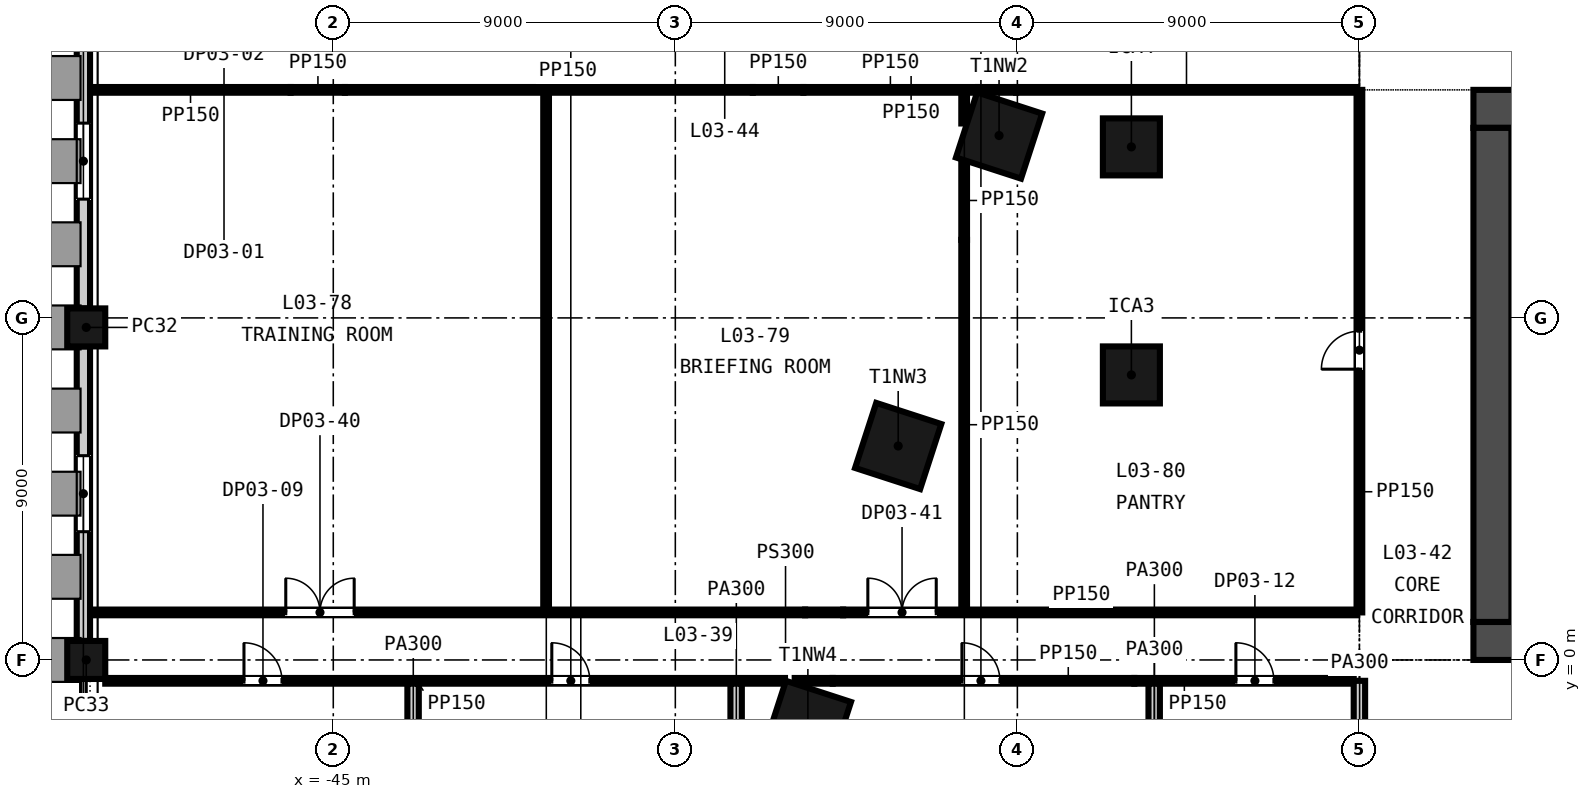
"""IFC4 building model, lengths in metres.
Left out: names, types, materials, properties, quantities, classifications, styles, units other than length and angle.
Written with IfcOpenShell. Run it as: python <this file> out.ifc"""

import sys

from ifc_helpers import new_model, si_unit, direction, frame, frame_2d, origin, origin_2d, place, context, subcontext, project, spatial, rectangle, extrude, element, fill, save


model = new_model("IFC4")
c1 = context("Model", 3, precision=1e-05, world=origin(), true_north=direction((0.0, 1.0)))
c2 = subcontext(c1, "Body", "Model", "MODEL_VIEW")
j1 = project(units=[si_unit("LENGTHUNIT", "METRE"), si_unit("PLANEANGLEUNIT", "RADIAN")], contexts=[c1])
p1 = place(None, origin())
s1 = spatial("IfcSite", under=j1, at=p1, CompositionType="ELEMENT")
p2 = place(p1, origin())
s2 = spatial("IfcBuilding", under=s1, at=p2, CompositionType="ELEMENT")
p3 = place(p2, frame((0.0, 0.0, 22.5)))
s3 = spatial("IfcBuildingStorey", under=s2, at=p3, CompositionType="ELEMENT", Elevation=22.5)
p4 = place(p3, frame((-15.0, 0.5, -0.3), z_axis=(0.0, 0.0, 1.0), x_axis=(1.0, 0.0, 0.0)))
e1 = element("IfcWall", 1, at=p4, inside=s3, PredefinedType="SOLIDWALL", context=c2, shape_type="SweptSolid", body=[
    extrude(rectangle(XDim=30.0, YDim=1.0, at=frame_2d((15.0, 0.0))), origin(), (0.0, 0.0, 1.0), 4.5),
])
p5 = place(p4, frame((5.8, 0.0, 0.3)))
e2 = element("IfcOpeningElement", 2, at=p5, cuts=e1, PredefinedType="OPENING", context=c2, shape_type="SweptSolid", body=[
    extrude(rectangle(XDim=2.4, YDim=2.4, at=frame_2d((1.2, 1.2))), frame((0.0, 0.51, 0.0), z_axis=(0.0, -1.0, 0.0), x_axis=(1.0, 0.0, 0.0)), (0.0, 0.0, 1.0), 1.02),
])
p6 = place(p4, frame((13.8, 0.0, 0.3)))
e3 = element("IfcOpeningElement", 3, at=p6, cuts=e1, PredefinedType="OPENING", context=c2, shape_type="SweptSolid", body=[
    extrude(rectangle(XDim=2.4, YDim=2.4, at=frame_2d((1.2, 1.2))), frame((0.0, 0.51, 0.0), z_axis=(0.0, -1.0, 0.0), x_axis=(1.0, 0.0, 0.0)), (0.0, 0.0, 1.0), 1.02),
])
p7 = place(p4, frame((21.8, 0.0, 0.3)))
e4 = element("IfcOpeningElement", 4, at=p7, cuts=e1, PredefinedType="OPENING", context=c2, shape_type="SweptSolid", body=[
    extrude(rectangle(XDim=2.4, YDim=2.4, at=frame_2d((1.2, 1.2))), frame((0.0, 0.51, 0.0), z_axis=(0.0, -1.0, 0.0), x_axis=(1.0, 0.0, 0.0)), (0.0, 0.0, 1.0), 1.02),
])
p8 = place(p4, frame((1.5, 0.0, 0.3)))
e5 = element("IfcOpeningElement", 5, at=p8, cuts=e1, PredefinedType="OPENING", context=c2, shape_type="SweptSolid", body=[
    extrude(rectangle(XDim=1.2, YDim=2.1, at=frame_2d((0.6, 1.05))), frame((0.0, 0.51, 0.0), z_axis=(0.0, -1.0, 0.0), x_axis=(1.0, 0.0, 0.0)), (0.0, 0.0, 1.0), 1.02),
])
p9 = place(p4, frame((27.3, 0.0, 0.3)))
e6 = element("IfcOpeningElement", 6, at=p9, cuts=e1, PredefinedType="OPENING", context=c2, shape_type="SweptSolid", body=[
    extrude(rectangle(XDim=1.2, YDim=2.1, at=frame_2d((0.6, 1.05))), frame((0.0, 0.51, 0.0), z_axis=(0.0, -1.0, 0.0), x_axis=(1.0, 0.0, 0.0)), (0.0, 0.0, 1.0), 1.02),
])
p10 = place(p3, frame((-15.0, 14.5, -0.3), z_axis=(0.0, 0.0, 1.0), x_axis=(1.0, 0.0, 0.0)))
e7 = element("IfcWall", 7, at=p10, inside=s3, PredefinedType="SOLIDWALL", context=c2, shape_type="SweptSolid", body=[
    extrude(rectangle(XDim=30.0, YDim=1.0, at=frame_2d((15.0, 0.0))), origin(), (0.0, 0.0, 1.0), 4.5),
])
p11 = place(p10, frame((9.25, 0.0, 0.3)))
e8 = element("IfcOpeningElement", 8, at=p11, cuts=e7, PredefinedType="OPENING", context=c2, shape_type="SweptSolid", body=[
    extrude(rectangle(XDim=1.5, YDim=2.1, at=frame_2d((0.75, 1.05))), frame((0.0, 0.51, 0.0), z_axis=(0.0, -1.0, 0.0), x_axis=(1.0, 0.0, 0.0)), (0.0, 0.0, 1.0), 1.02),
])
p12 = place(p10, frame((19.4, 0.0, 0.3)))
e9 = element("IfcOpeningElement", 9, at=p12, cuts=e7, PredefinedType="OPENING", context=c2, shape_type="SweptSolid", body=[
    extrude(rectangle(XDim=1.5, YDim=2.1, at=frame_2d((0.75, 1.05))), frame((0.0, 0.51, 0.0), z_axis=(0.0, -1.0, 0.0), x_axis=(1.0, 0.0, 0.0)), (0.0, 0.0, 1.0), 1.02),
])
p13 = place(p10, frame((1.5, 0.0, 0.3)))
e10 = element("IfcOpeningElement", 10, at=p13, cuts=e7, PredefinedType="OPENING", context=c2, shape_type="SweptSolid", body=[
    extrude(rectangle(XDim=1.2, YDim=2.1, at=frame_2d((0.6, 1.05))), frame((0.0, 0.51, 0.0), z_axis=(0.0, -1.0, 0.0), x_axis=(1.0, 0.0, 0.0)), (0.0, 0.0, 1.0), 1.02),
])
p14 = place(p10, frame((27.3, 0.0, 0.3)))
e11 = element("IfcOpeningElement", 11, at=p14, cuts=e7, PredefinedType="OPENING", context=c2, shape_type="SweptSolid", body=[
    extrude(rectangle(XDim=1.2, YDim=2.1, at=frame_2d((0.6, 1.05))), frame((0.0, 0.51, 0.0), z_axis=(0.0, -1.0, 0.0), x_axis=(1.0, 0.0, 0.0)), (0.0, 0.0, 1.0), 1.02),
])
p15 = place(p3, frame((-14.5, 1.0, -0.3), z_axis=(0.0, 0.0, 1.0), x_axis=(0.0, 1.0, 0.0)))
e12 = element("IfcWall", 12, at=p15, inside=s3, PredefinedType="SOLIDWALL", context=c2, shape_type="SweptSolid", body=[
    extrude(rectangle(XDim=13.0, YDim=1.0, at=frame_2d((6.5, 0.0))), origin(), (0.0, 0.0, 1.0), 4.5),
])
for number, where, z_axis, x_axis in (
    (13, (-27.482, 13.799, -0.3), (0.0, 0.0, 1.0), (-0.309, -0.951, 0.0)),
    (14, (-30.136, 5.63, -0.3), (0.0, 0.0, 1.0), (-0.309, -0.951, 0.0)),
    (15, (-32.512, -1.683, -0.3), (0.0, 0.0, 1.0), (-0.309, -0.951, 0.0)),
):
    element("IfcColumn", number, at=place(p3, frame(where, z_axis=z_axis, x_axis=x_axis)), inside=s3, PredefinedType="COLUMN", context=c2, shape_type="SweptSolid", body=[
        extrude(rectangle(XDim=1.8, YDim=1.8, at=origin_2d()), origin(), (0.0, 0.0, 1.0), 4.5),
    ])
for number, where, z_axis, x_axis in (
    (16, (-24.0, 7.5, -0.3), (0.0, 0.0, 1.0), (1.0, 0.0, 0.0)),
    (17, (-24.0, 13.5, -0.3), (0.0, 0.0, 1.0), (1.0, 0.0, 0.0)),
):
    element("IfcColumn", number, at=place(p3, frame(where, z_axis=z_axis, x_axis=x_axis)), inside=s3, PredefinedType="COLUMN", context=c2, shape_type="SweptSolid", body=[
        extrude(rectangle(XDim=1.5, YDim=1.5, at=origin_2d()), origin(), (0.0, 0.0, 1.0), 4.5),
    ])
for number, where, z_axis, x_axis in (
    (18, (-51.5, 8.75, -0.3), (0.0, 0.0, 1.0), (0.0, -1.0, 0.0)),
    (19, (-51.5, 0.0, -0.3), (0.0, 0.0, 1.0), (0.0, -1.0, 0.0)),
):
    element("IfcColumn", number, at=place(p3, frame(where, z_axis=z_axis, x_axis=x_axis)), inside=s3, PredefinedType="COLUMN", context=c2, shape_type="SweptSolid", body=[
        extrude(rectangle(XDim=1.0, YDim=1.0, at=origin_2d()), origin(), (0.0, 0.0, 1.0), 4.5),
    ])
p16 = place(p3, frame((-51.575, 17.0, -0.3), z_axis=(0.0, 0.0, 1.0), x_axis=(0.0, -1.0, 0.0)))
e20 = element("IfcWall", 20, at=p16, inside=s3, PredefinedType="SOLIDWALL", context=c2, shape_type="SweptSolid", body=[
    extrude(rectangle(XDim=7.75, YDim=0.35, at=frame_2d((3.875, 0.0))), origin(), (0.0, 0.0, 1.0), 3.6),
])
p17 = place(p16, frame((2.875, 0.0, 1.2)))
e21 = element("IfcOpeningElement", 21, at=p17, cuts=e20, PredefinedType="OPENING", context=c2, shape_type="SweptSolid", body=[
    extrude(rectangle(XDim=2.0, YDim=2.35, at=frame_2d((1.0, 1.175))), frame((0.0, 0.185, 0.0), z_axis=(0.0, -1.0, 0.0), x_axis=(1.0, 0.0, 0.0)), (0.0, 0.0, 1.0), 0.37),
])
p18 = place(p3, frame((-51.575, 8.25, -0.3), z_axis=(0.0, 0.0, 1.0), x_axis=(0.0, -1.0, 0.0)))
e22 = element("IfcWall", 22, at=p18, inside=s3, PredefinedType="SOLIDWALL", context=c2, shape_type="SweptSolid", body=[
    extrude(rectangle(XDim=7.75, YDim=0.35, at=frame_2d((3.875, 0.0))), origin(), (0.0, 0.0, 1.0), 3.6),
])
p19 = place(p18, frame((2.875, 0.0, 1.2)))
e23 = element("IfcOpeningElement", 23, at=p19, cuts=e22, PredefinedType="OPENING", context=c2, shape_type="SweptSolid", body=[
    extrude(rectangle(XDim=2.0, YDim=2.35, at=frame_2d((1.0, 1.175))), frame((0.0, 0.185, 0.0), z_axis=(0.0, -1.0, 0.0), x_axis=(1.0, 0.0, 0.0)), (0.0, 0.0, 1.0), 0.37),
])
p20 = place(p3, frame((-51.0, -0.549, 0.0), z_axis=(0.0, 0.0, 1.0), x_axis=(1.0, 0.0, 0.0)))
e24 = element("IfcWall", 24, at=p20, inside=s3, PredefinedType="PARTITIONING", context=c2, shape_type="SweptSolid", body=[
    extrude(rectangle(XDim=17.886, YDim=0.15, at=frame_2d((8.943, 0.0))), origin(), (0.0, 0.0, 1.0), 4.2),
])
p21 = place(p20, frame((3.65, 0.0, 0.0)))
e25 = element("IfcOpeningElement", 25, at=p21, cuts=e24, PredefinedType="OPENING", context=c2, shape_type="SweptSolid", body=[
    extrude(rectangle(XDim=1.0, YDim=2.1, at=frame_2d((0.5, 1.05))), frame((0.0, 0.085, 0.0), z_axis=(0.0, -1.0, 0.0), x_axis=(1.0, 0.0, 0.0)), (0.0, 0.0, 1.0), 0.17),
])
p22 = place(p20, frame((11.75, 0.0, 0.0)))
e26 = element("IfcOpeningElement", 26, at=p22, cuts=e24, PredefinedType="OPENING", context=c2, shape_type="SweptSolid", body=[
    extrude(rectangle(XDim=1.0, YDim=2.1, at=frame_2d((0.5, 1.05))), frame((0.0, 0.085, 0.0), z_axis=(0.0, -1.0, 0.0), x_axis=(1.0, 0.0, 0.0)), (0.0, 0.0, 1.0), 0.17),
])
p23 = place(p3, frame((-32.859, -0.549, 0.0), z_axis=(0.0, 0.0, 1.0), x_axis=(1.0, 0.0, 0.0)))
e27 = element("IfcWall", 27, at=p23, inside=s3, PredefinedType="PARTITIONING", context=c2, shape_type="SweptSolid", body=[
    extrude(rectangle(XDim=1.0, YDim=0.15, at=frame_2d((0.5, 0.0))), origin(), (0.0, 0.0, 1.0), 3.2),
])
p24 = place(p3, frame((-31.859, -0.549, 0.0), z_axis=(0.0, 0.0, 1.0), x_axis=(1.0, 0.0, 0.0)))
e28 = element("IfcWall", 28, at=p24, inside=s3, PredefinedType="PARTITIONING", context=c2, shape_type="SweptSolid", body=[
    extrude(rectangle(XDim=7.936, YDim=0.15, at=frame_2d((3.968, 0.0))), origin(), (0.0, 0.0, 1.0), 4.2),
])
p25 = place(p24, frame((3.4, 0.0, 0.0)))
e29 = element("IfcOpeningElement", 29, at=p25, cuts=e28, PredefinedType="OPENING", context=c2, shape_type="SweptSolid", body=[
    extrude(rectangle(XDim=1.0, YDim=2.1, at=frame_2d((0.5, 1.05))), frame((0.0, 0.085, 0.0), z_axis=(0.0, -1.0, 0.0), x_axis=(1.0, 0.0, 0.0)), (0.0, 0.0, 1.0), 0.17),
])
p26 = place(p3, frame((-23.923, -0.549, 0.0), z_axis=(0.0, 0.0, 1.0), x_axis=(1.0, 0.0, 0.0)))
e30 = element("IfcWall", 30, at=p26, inside=s3, PredefinedType="PARTITIONING", context=c2, shape_type="SweptSolid", body=[
    extrude(rectangle(XDim=5.773, YDim=0.15, at=frame_2d((2.886, 0.0))), origin(), (0.0, 0.0, 1.0), 3.521),
])
p27 = place(p26, frame((2.673, 0.0, 0.0)))
e31 = element("IfcOpeningElement", 31, at=p27, cuts=e30, PredefinedType="OPENING", context=c2, shape_type="SweptSolid", body=[
    extrude(rectangle(XDim=1.0, YDim=2.1, at=frame_2d((0.5, 1.05))), frame((0.0, 0.085, 0.0), z_axis=(0.0, -1.0, 0.0), x_axis=(1.0, 0.0, 0.0)), (0.0, 0.0, 1.0), 0.17),
])
p28 = place(p3, frame((-51.4, 1.251, 0.0), z_axis=(0.0, 0.0, 1.0), x_axis=(1.0, 0.0, 0.0)))
e32 = element("IfcWall", 32, at=p28, inside=s3, PredefinedType="PARTITIONING", context=c2, shape_type="SweptSolid", body=[
    extrude(rectangle(XDim=18.815, YDim=0.15, at=frame_2d((9.408, 0.0))), origin(), (0.0, 0.0, 1.0), 4.2),
])
p29 = place(p28, frame((5.15, 0.0, 0.0)))
e33 = element("IfcOpeningElement", 33, at=p29, cuts=e32, PredefinedType="OPENING", context=c2, shape_type="SweptSolid", body=[
    extrude(rectangle(XDim=1.8, YDim=2.4, at=frame_2d((0.9, 1.2))), frame((0.0, 0.085, 0.0), z_axis=(0.0, -1.0, 0.0), x_axis=(1.0, 0.0, 0.0)), (0.0, 0.0, 1.0), 0.17),
])
p30 = place(p3, frame((-32.584, 1.251, 0.0), z_axis=(0.0, 0.0, 1.0), x_axis=(1.0, 0.0, 0.0)))
e34 = element("IfcWall", 34, at=p30, inside=s3, PredefinedType="PARTITIONING", context=c2, shape_type="SweptSolid", body=[
    extrude(rectangle(XDim=1.0, YDim=0.15, at=frame_2d((0.5, 0.0))), origin(), (0.0, 0.0, 1.0), 3.2),
])
p31 = place(p3, frame((-31.584, 1.251, 0.0), z_axis=(0.0, 0.0, 1.0), x_axis=(1.0, 0.0, 0.0)))
e35 = element("IfcWall", 35, at=p31, inside=s3, PredefinedType="PARTITIONING", context=c2, shape_type="SweptSolid", body=[
    extrude(rectangle(XDim=13.51, YDim=0.15, at=frame_2d((6.755, 0.0))), origin(), (0.0, 0.0, 1.0), 4.2),
])
p32 = place(p31, frame((0.65, 0.0, 0.0)))
e36 = element("IfcOpeningElement", 36, at=p32, cuts=e35, PredefinedType="OPENING", context=c2, shape_type="SweptSolid", body=[
    extrude(rectangle(XDim=1.8, YDim=2.4, at=frame_2d((0.9, 1.2))), frame((0.0, 0.085, 0.0), z_axis=(0.0, -1.0, 0.0), x_axis=(1.0, 0.0, 0.0)), (0.0, 0.0, 1.0), 0.17),
])
p33 = place(p3, frame((-51.4, 15.0, 0.0), z_axis=(0.0, 0.0, 1.0), x_axis=(1.0, 0.0, 0.0)))
e37 = element("IfcWall", 37, at=p33, inside=s3, PredefinedType="PARTITIONING", context=c2, shape_type="SweptSolid", body=[
    extrude(rectangle(XDim=5.277, YDim=0.15, at=frame_2d((2.639, 0.0))), origin(), (0.0, 0.0, 1.0), 4.2),
])
p34 = place(p3, frame((-46.123, 15.0, 0.0), z_axis=(0.0, 0.0, 1.0), x_axis=(1.0, 0.0, 0.0)))
e38 = element("IfcWall", 38, at=p34, inside=s3, PredefinedType="PARTITIONING", context=c2, shape_type="SweptSolid", body=[
    extrude(rectangle(XDim=1.428, YDim=0.15, at=frame_2d((0.714, 0.0))), origin(), (0.0, 0.0, 1.0), 3.219),
])
p35 = place(p3, frame((-44.695, 15.0, 0.0), z_axis=(0.0, 0.0, 1.0), x_axis=(1.0, 0.0, 0.0)))
e39 = element("IfcWall", 39, at=p35, inside=s3, PredefinedType="PARTITIONING", context=c2, shape_type="SweptSolid", body=[
    extrude(rectangle(XDim=10.734, YDim=0.15, at=frame_2d((5.367, 0.0))), origin(), (0.0, 0.0, 1.0), 4.2),
])
p36 = place(p3, frame((-33.961, 15.0, 0.0), z_axis=(0.0, 0.0, 1.0), x_axis=(1.0, 0.0, 0.0)))
e40 = element("IfcWall", 40, at=p36, inside=s3, PredefinedType="PARTITIONING", context=c2, shape_type="SweptSolid", body=[
    extrude(rectangle(XDim=1.331, YDim=0.15, at=frame_2d((0.666, 0.0))), origin(), (0.0, 0.0, 1.0), 3.111),
])
p37 = place(p3, frame((-32.63, 15.0, 0.0), z_axis=(0.0, 0.0, 1.0), x_axis=(1.0, 0.0, 0.0)))
e41 = element("IfcWall", 41, at=p37, inside=s3, PredefinedType="PARTITIONING", context=c2, shape_type="SweptSolid", body=[
    extrude(rectangle(XDim=4.568, YDim=0.15, at=frame_2d((2.284, 0.0))), origin(), (0.0, 0.0, 1.0), 4.2),
])
p38 = place(p3, frame((-28.035, 15.0, 0.0), z_axis=(0.0, 0.0, 1.0), x_axis=(1.0, 0.0, 0.0)))
e42 = element("IfcWall", 42, at=p38, inside=s3, PredefinedType="PARTITIONING", context=c2, shape_type="SweptSolid", body=[
    extrude(rectangle(XDim=1.0, YDim=0.15, at=frame_2d((0.5, 0.0))), origin(), (0.0, 0.0, 1.0), 3.2),
])
p39 = place(p3, frame((-27.035, 15.0, 0.0), z_axis=(0.0, 0.0, 1.0), x_axis=(1.0, 0.0, 0.0)))
e43 = element("IfcWall", 43, at=p39, inside=s3, PredefinedType="PARTITIONING", context=c2, shape_type="SweptSolid", body=[
    extrude(rectangle(XDim=8.96, YDim=0.15, at=frame_2d((4.48, 0.0))), origin(), (0.0, 0.0, 1.0), 4.2),
])
p40 = place(p3, frame((-42.9, -3.801, 0.0), z_axis=(0.0, 0.0, 1.0), x_axis=(0.0, 1.0, 0.0)))
e44 = element("IfcWall", 44, at=p40, inside=s3, PredefinedType="PARTITIONING", context=c2, shape_type="SweptSolid", body=[
    extrude(rectangle(XDim=3.177, YDim=0.3, at=frame_2d((1.588, 0.0))), origin(), (0.0, 0.0, 1.0), 4.2),
])
p41 = place(p3, frame((-39.4, 1.326, 0.0), z_axis=(0.0, 0.0, 1.0), x_axis=(0.0, 1.0, 0.0)))
e45 = element("IfcWall", 45, at=p41, inside=s3, PredefinedType="PARTITIONING", context=c2, shape_type="SweptSolid", body=[
    extrude(rectangle(XDim=13.599, YDim=0.15, at=frame_2d((6.8, 0.0))), origin(), (0.0, 0.0, 1.0), 4.2),
])
p42 = place(p3, frame((-34.4, -2.892, 0.0), z_axis=(0.0, 0.0, 1.0), x_axis=(0.0, 1.0, 0.0)))
e46 = element("IfcWall", 46, at=p42, inside=s3, PredefinedType="PARTITIONING", context=c2, shape_type="SweptSolid", body=[
    extrude(rectangle(XDim=2.268, YDim=0.3, at=frame_2d((1.134, 0.0))), origin(), (0.0, 0.0, 1.0), 4.2),
])
p43 = place(p3, frame((-28.4, 1.326, 0.0), z_axis=(0.0, 0.0, 1.0), x_axis=(0.0, 1.0, 0.0)))
e47 = element("IfcWall", 47, at=p43, inside=s3, PredefinedType="PARTITIONING", context=c2, shape_type="SweptSolid", body=[
    extrude(rectangle(XDim=9.728, YDim=0.15, at=frame_2d((4.864, 0.0))), origin(), (0.0, 0.0, 1.0), 4.2),
])
p44 = place(p3, frame((-28.4, 11.053, 0.0), z_axis=(0.0, 0.0, 1.0), x_axis=(0.0, 1.0, 0.0)))
e48 = element("IfcWall", 48, at=p44, inside=s3, PredefinedType="PARTITIONING", context=c2, shape_type="SweptSolid", body=[
    extrude(rectangle(XDim=2.073, YDim=0.15, at=frame_2d((1.037, 0.0))), origin(), (0.0, 0.0, 1.0), 3.2),
])
p45 = place(p3, frame((-28.4, 14.116, 0.0), z_axis=(0.0, 0.0, 1.0), x_axis=(0.0, 1.0, 0.0)))
e49 = element("IfcWall", 49, at=p45, inside=s3, PredefinedType="PARTITIONING", context=c2, shape_type="SweptSolid", body=[
    extrude(rectangle(XDim=0.809, YDim=0.15, at=frame_2d((0.405, 0.0))), origin(), (0.0, 0.0, 1.0), 4.2),
])
p46 = place(p3, frame((-23.4, -5.084, 0.0), z_axis=(0.0, 0.0, 1.0), x_axis=(0.0, 1.0, 0.0)))
e50 = element("IfcWall", 50, at=p46, inside=s3, PredefinedType="PARTITIONING", context=c2, shape_type="SweptSolid", body=[
    extrude(rectangle(XDim=4.46, YDim=0.3, at=frame_2d((2.23, 0.0))), origin(), (0.0, 0.0, 1.0), 4.2),
])
p47 = place(p3, frame((-18.0, -3.2, 0.0), z_axis=(0.0, 0.0, 1.0), x_axis=(0.0, 1.0, 0.0)))
e51 = element("IfcWall", 51, at=p47, inside=s3, PredefinedType="PARTITIONING", context=c2, shape_type="SweptSolid", body=[
    extrude(rectangle(XDim=2.651, YDim=0.3, at=frame_2d((1.326, 0.0))), origin(), (0.0, 0.0, 1.0), 4.2),
])
p48 = place(p3, frame((-18.0, 1.251, 0.0), z_axis=(0.0, 0.0, 1.0), x_axis=(0.0, 1.0, 0.0)))
e52 = element("IfcWall", 52, at=p48, inside=s3, PredefinedType="PARTITIONING", context=c2, shape_type="SweptSolid", body=[
    extrude(rectangle(XDim=13.749, YDim=0.15, at=frame_2d((6.875, 0.0))), origin(), (0.0, 0.0, 1.0), 4.2),
])
p49 = place(p48, frame((6.4, 0.0, 0.0)))
e53 = element("IfcOpeningElement", 53, at=p49, cuts=e52, PredefinedType="OPENING", context=c2, shape_type="SweptSolid", body=[
    extrude(rectangle(XDim=1.0, YDim=2.1, at=frame_2d((0.5, 1.05))), frame((0.0, 0.085, 0.0), z_axis=(0.0, -1.0, 0.0), x_axis=(1.0, 0.0, 0.0)), (0.0, 0.0, 1.0), 0.17),
])
p50 = place(p17, origin())
e54 = element("IfcWindow", 54, at=p50, inside=s3, PartitioningType="SINGLE_PANEL", PredefinedType="WINDOW", context=c2, shape_type="SweptSolid", body=[
    extrude(rectangle(XDim=2.0, YDim=2.35, at=frame_2d((1.0, 1.175))), frame((0.0, 0.03, 0.0), z_axis=(0.0, -1.0, 0.0), x_axis=(1.0, 0.0, 0.0)), (0.0, 0.0, 1.0), 0.06),
])
fill(e21, e54)
p51 = place(p19, origin())
e55 = element("IfcWindow", 55, at=p51, inside=s3, PartitioningType="SINGLE_PANEL", PredefinedType="WINDOW", context=c2, shape_type="SweptSolid", body=[
    extrude(rectangle(XDim=2.0, YDim=2.35, at=frame_2d((1.0, 1.175))), frame((0.0, 0.03, 0.0), z_axis=(0.0, -1.0, 0.0), x_axis=(1.0, 0.0, 0.0)), (0.0, 0.0, 1.0), 0.06),
])
fill(e23, e55)
p52 = place(p21, origin())
e56 = element("IfcDoor", 56, at=p52, inside=s3, OperationType="SINGLE_SWING_LEFT", PredefinedType="DOOR", context=c2, shape_type="SweptSolid", body=[
    extrude(rectangle(XDim=1.0, YDim=2.1, at=frame_2d((0.5, 1.05))), frame((0.0, 0.025, 0.0), z_axis=(0.0, -1.0, 0.0), x_axis=(1.0, 0.0, 0.0)), (0.0, 0.0, 1.0), 0.05),
])
fill(e25, e56)
p53 = place(p22, origin())
e57 = element("IfcDoor", 57, at=p53, inside=s3, OperationType="SINGLE_SWING_LEFT", PredefinedType="DOOR", context=c2, shape_type="SweptSolid", body=[
    extrude(rectangle(XDim=1.0, YDim=2.1, at=frame_2d((0.5, 1.05))), frame((0.0, 0.025, 0.0), z_axis=(0.0, -1.0, 0.0), x_axis=(1.0, 0.0, 0.0)), (0.0, 0.0, 1.0), 0.05),
])
fill(e26, e57)
p54 = place(p25, origin())
e58 = element("IfcDoor", 58, at=p54, inside=s3, OperationType="SINGLE_SWING_LEFT", PredefinedType="DOOR", context=c2, shape_type="SweptSolid", body=[
    extrude(rectangle(XDim=1.0, YDim=2.1, at=frame_2d((0.5, 1.05))), frame((0.0, 0.025, 0.0), z_axis=(0.0, -1.0, 0.0), x_axis=(1.0, 0.0, 0.0)), (0.0, 0.0, 1.0), 0.05),
])
fill(e29, e58)
p55 = place(p27, origin())
e59 = element("IfcDoor", 59, at=p55, inside=s3, OperationType="SINGLE_SWING_LEFT", PredefinedType="DOOR", context=c2, shape_type="SweptSolid", body=[
    extrude(rectangle(XDim=1.0, YDim=2.1, at=frame_2d((0.5, 1.05))), frame((0.0, 0.025, 0.0), z_axis=(0.0, -1.0, 0.0), x_axis=(1.0, 0.0, 0.0)), (0.0, 0.0, 1.0), 0.05),
])
fill(e31, e59)
p56 = place(p29, origin())
e60 = element("IfcDoor", 60, at=p56, inside=s3, OperationType="SINGLE_SWING_LEFT", PredefinedType="DOOR", context=c2, shape_type="SweptSolid", body=[
    extrude(rectangle(XDim=1.8, YDim=2.4, at=frame_2d((0.9, 1.2))), frame((0.0, 0.025, 0.0), z_axis=(0.0, -1.0, 0.0), x_axis=(1.0, 0.0, 0.0)), (0.0, 0.0, 1.0), 0.05),
])
fill(e33, e60)
p57 = place(p32, origin())
e61 = element("IfcDoor", 61, at=p57, inside=s3, OperationType="SINGLE_SWING_LEFT", PredefinedType="DOOR", context=c2, shape_type="SweptSolid", body=[
    extrude(rectangle(XDim=1.8, YDim=2.4, at=frame_2d((0.9, 1.2))), frame((0.0, 0.025, 0.0), z_axis=(0.0, -1.0, 0.0), x_axis=(1.0, 0.0, 0.0)), (0.0, 0.0, 1.0), 0.05),
])
fill(e36, e61)
p58 = place(p49, origin())
e62 = element("IfcDoor", 62, at=p58, inside=s3, OperationType="SINGLE_SWING_LEFT", PredefinedType="DOOR", context=c2, shape_type="SweptSolid", body=[
    extrude(rectangle(XDim=1.0, YDim=2.1, at=frame_2d((0.5, 1.05))), frame((0.0, 0.025, 0.0), z_axis=(0.0, -1.0, 0.0), x_axis=(1.0, 0.0, 0.0)), (0.0, 0.0, 1.0), 0.05),
])
fill(e53, e62)
save(model, sys.argv[1])
